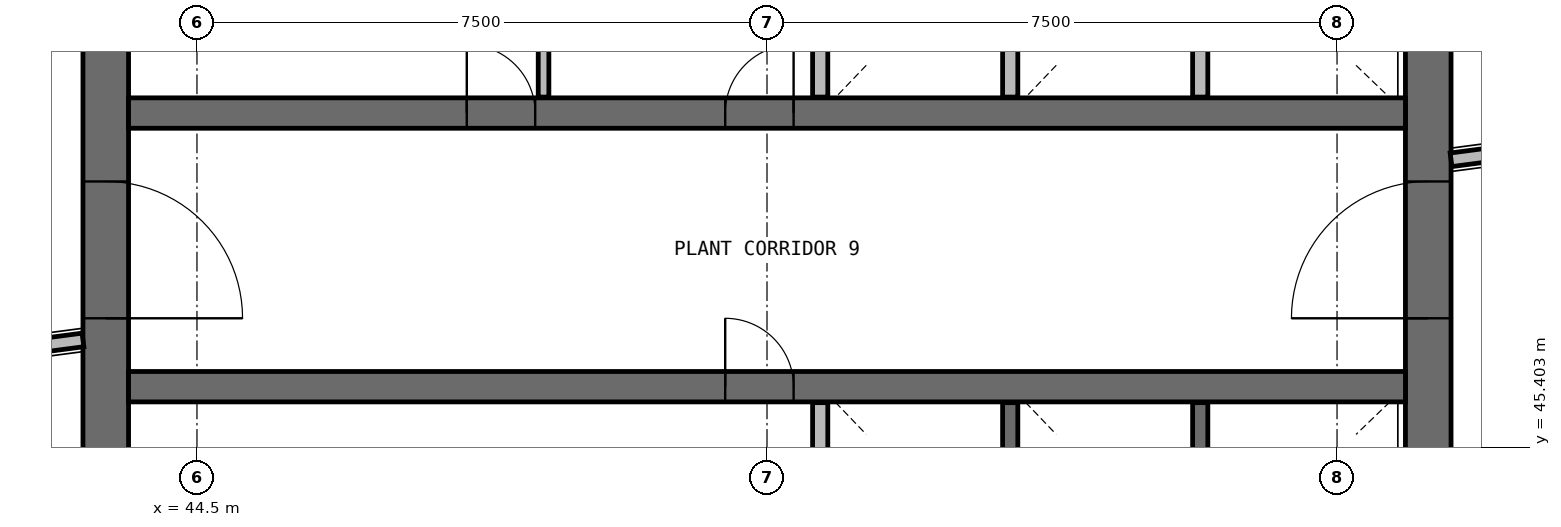
"""IFC4 building model, lengths in metres.
Left out: names, types, materials, properties, quantities, classifications, styles, units other than length and angle.
Written with IfcOpenShell. Run it as: python <this file> out.ifc"""

import sys

from ifc_helpers import new_model, si_unit, direction, frame, frame_2d, origin, place, context, subcontext, project, spatial, rectangle, extrude, source, transform, mapped, element, fill, save


model = new_model("IFC4")
c1 = context("Model", 3, precision=1e-05, world=origin(), true_north=direction((0.0, 1.0)))
c2 = subcontext(c1, "Body", "Model", "MODEL_VIEW")
j1 = project(units=[si_unit("LENGTHUNIT", "METRE"), si_unit("PLANEANGLEUNIT", "RADIAN")], contexts=[c1])
p1 = place(None, origin())
s1 = spatial("IfcSite", under=j1, at=p1, CompositionType="ELEMENT")
p2 = place(p1, origin())
s2 = spatial("IfcBuilding", under=s1, at=p2, CompositionType="ELEMENT")
p3 = place(p2, frame((0.0, 0.0, 230.6)))
s3 = spatial("IfcBuildingStorey", under=s2, at=p3, CompositionType="ELEMENT", Elevation=230.6)
p4 = place(p3, frame((60.7, 40.0, 0.0), z_axis=(0.0, 0.0, 1.0), x_axis=(0.0, 1.0, 0.0)))
e1 = element("IfcWall", 1, at=p4, inside=s3, PredefinedType="SHEAR", context=c2, shape_type="SweptSolid", body=[
    extrude(rectangle(XDim=16.0, YDim=0.6, at=frame_2d((8.0, 0.0))), origin(), (0.0, 0.0, 1.0), 3.9),
])
p5 = place(p4, frame((7.1, 0.0, 0.0)))
e2 = element("IfcOpeningElement", 2, at=p5, cuts=e1, PredefinedType="OPENING", context=c2, shape_type="SweptSolid", body=[
    extrude(rectangle(XDim=1.8, YDim=2.1, at=frame_2d((0.9, 1.05))), frame((0.0, 0.31, 0.0), z_axis=(0.0, -1.0, 0.0), x_axis=(1.0, 0.0, 0.0)), (0.0, 0.0, 1.0), 0.62),
])
p6 = place(p3, frame((43.3, 56.0, 0.0), z_axis=(0.0, 0.0, 1.0), x_axis=(0.0, -1.0, 0.0)))
e3 = element("IfcWall", 3, at=p6, inside=s3, PredefinedType="SHEAR", context=c2, shape_type="SweptSolid", body=[
    extrude(rectangle(XDim=16.0, YDim=0.6, at=frame_2d((8.0, 0.0))), origin(), (0.0, 0.0, 1.0), 3.9),
])
p7 = place(p6, frame((7.1, 0.0, 0.0)))
e4 = element("IfcOpeningElement", 4, at=p7, cuts=e3, PredefinedType="OPENING", context=c2, shape_type="SweptSolid", body=[
    extrude(rectangle(XDim=1.8, YDim=2.1, at=frame_2d((0.9, 1.05))), frame((0.0, 0.31, 0.0), z_axis=(0.0, -1.0, 0.0), x_axis=(1.0, 0.0, 0.0)), (0.0, 0.0, 1.0), 0.62),
])
p8 = place(p3, frame((43.6, 49.8, 0.0), z_axis=(0.0, 0.0, 1.0), x_axis=(1.0, 0.0, 0.0)))
e5 = element("IfcWall", 5, at=p8, inside=s3, PredefinedType="SHEAR", context=c2, shape_type="SweptSolid", body=[
    extrude(rectangle(XDim=16.8, YDim=0.4, at=frame_2d((8.4, 0.0))), origin(), (0.0, 0.0, 1.0), 3.9),
])
p9 = place(p8, frame((4.45, 0.0, 0.0)))
e6 = element("IfcOpeningElement", 6, at=p9, cuts=e5, PredefinedType="OPENING", context=c2, shape_type="SweptSolid", body=[
    extrude(rectangle(XDim=0.9, YDim=2.1, at=frame_2d((0.45, 1.05))), frame((0.0, 0.21, 0.0), z_axis=(0.0, -1.0, 0.0), x_axis=(1.0, 0.0, 0.0)), (0.0, 0.0, 1.0), 0.42),
])
p10 = place(p8, frame((7.85, 0.0, 0.0)))
e7 = element("IfcOpeningElement", 7, at=p10, cuts=e5, PredefinedType="OPENING", context=c2, shape_type="SweptSolid", body=[
    extrude(rectangle(XDim=0.9, YDim=2.1, at=frame_2d((0.45, 1.05))), frame((0.0, 0.21, 0.0), z_axis=(0.0, -1.0, 0.0), x_axis=(1.0, 0.0, 0.0)), (0.0, 0.0, 1.0), 0.42),
])
p11 = place(p3, frame((43.6, 46.2, 0.0), z_axis=(0.0, 0.0, 1.0), x_axis=(1.0, 0.0, 0.0)))
e8 = element("IfcWall", 8, at=p11, inside=s3, PredefinedType="SHEAR", context=c2, shape_type="SweptSolid", body=[
    extrude(rectangle(XDim=16.8, YDim=0.4, at=frame_2d((8.4, 0.0))), origin(), (0.0, 0.0, 1.0), 3.9),
])
p12 = place(p11, frame((7.85, 0.0, 0.0)))
e9 = element("IfcOpeningElement", 9, at=p12, cuts=e8, PredefinedType="OPENING", context=c2, shape_type="SweptSolid", body=[
    extrude(rectangle(XDim=0.9, YDim=2.1, at=frame_2d((0.45, 1.05))), frame((0.0, 0.21, 0.0), z_axis=(0.0, -1.0, 0.0), x_axis=(1.0, 0.0, 0.0)), (0.0, 0.0, 1.0), 0.42),
])
for number, where, z_axis, x_axis in (
    (10, (52.7, 45.99, 0.0), (0.0, 0.0, 1.0), (0.0, -1.0, 0.0)),
    (11, (52.7, 52.37, 0.0), (0.0, 0.0, 1.0), (0.0, -1.0, 0.0)),
    (12, (55.2, 43.63, 0.0), (0.0, 0.0, 1.0), (0.0, 1.0, 0.0)),
    (13, (55.2, 50.01, 0.0), (0.0, 0.0, 1.0), (0.0, 1.0, 0.0)),
    (14, (57.7, 43.63, 0.0), (0.0, 0.0, 1.0), (0.0, 1.0, 0.0)),
):
    element("IfcWall", number, at=place(p3, frame(where, z_axis=z_axis, x_axis=x_axis)), inside=s3, PredefinedType="SOLIDWALL", context=c2, shape_type="SweptSolid", body=[
        extrude(rectangle(XDim=2.36, YDim=0.2, at=frame_2d((1.18, 0.0))), origin(), (0.0, 0.0, 1.0), 3.58),
    ])
p13 = place(p3, frame((57.7, 50.01, 0.0), z_axis=(0.0, 0.0, 1.0), x_axis=(0.0, 1.0, 0.0)))
e15 = element("IfcWall", 15, at=p13, inside=s3, PredefinedType="SOLIDWALL", context=c2, shape_type="SweptSolid", body=[
    extrude(rectangle(XDim=2.39, YDim=0.2, at=frame_2d((1.195, 0.0))), origin(), (0.0, 0.0, 1.0), 3.58),
])
p14 = place(p3, frame((40.69, 46.511, 0.0), z_axis=(0.0, 0.0, 1.0), x_axis=(0.991440737811, 0.130557509967, 0.0)))
e16 = element("IfcWall", 16, at=p14, inside=s3, PredefinedType="PARTITIONING", context=c2, shape_type="SweptSolid", body=[
    extrude(rectangle(XDim=2.33, YDim=0.18, at=frame_2d((1.165, 0.0))), origin(), (0.0, 0.0, 1.0), 2.38),
])
p15 = place(p14, frame((0.48, 0.0, 0.0)))
e17 = element("IfcOpeningElement", 17, at=p15, cuts=e16, PredefinedType="OPENING", context=c2, shape_type="SweptSolid", body=[
    extrude(rectangle(XDim=1.2, YDim=2.1, at=frame_2d((0.6, 1.05))), frame((0.0, 0.1, 0.0), z_axis=(0.0, -1.0, 0.0), x_axis=(1.0, 0.0, 0.0)), (0.0, 0.0, 1.0), 0.2),
])
p16 = place(p3, frame((63.31, 49.489, 0.0), z_axis=(0.0, 0.0, 1.0), x_axis=(-0.991440737811, -0.130557509967, 0.0)))
e18 = element("IfcWall", 18, at=p16, inside=s3, PredefinedType="PARTITIONING", context=c2, shape_type="SweptSolid", body=[
    extrude(rectangle(XDim=2.33, YDim=0.18, at=frame_2d((1.165, 0.0))), origin(), (0.0, 0.0, 1.0), 2.38),
])
p17 = place(p16, frame((0.48, 0.0, 0.0)))
e19 = element("IfcOpeningElement", 19, at=p17, cuts=e18, PredefinedType="OPENING", context=c2, shape_type="SweptSolid", body=[
    extrude(rectangle(XDim=1.2, YDim=2.1, at=frame_2d((0.6, 1.05))), frame((0.0, 0.1, 0.0), z_axis=(0.0, -1.0, 0.0), x_axis=(1.0, 0.0, 0.0)), (0.0, 0.0, 1.0), 0.2),
])
p18 = place(p3, frame((49.06, 50.01, 0.0), z_axis=(0.0, 0.0, 1.0), x_axis=(0.0, 1.0, 0.0)))
e20 = element("IfcWall", 20, at=p18, inside=s3, PredefinedType="PARTITIONING", context=c2, shape_type="SweptSolid", body=[
    extrude(rectangle(XDim=2.29, YDim=0.14, at=frame_2d((1.145, 0.0))), origin(), (0.0, 0.0, 1.0), 2.88),
])
m1 = source(origin(), c2, "Body", "SweptSolid", [
    extrude(rectangle(XDim=1.8, YDim=2.1, at=frame_2d((0.9, 1.05))), frame((0.0, 0.025, 0.0), z_axis=(0.0, -1.0, 0.0), x_axis=(1.0, 0.0, 0.0)), (0.0, 0.0, 1.0), 0.05),
])
p19 = place(p7, origin())
e21 = element("IfcDoor", 21, at=p19, inside=s3, OperationType="SINGLE_SWING_RIGHT", PredefinedType="DOOR", context=c2, shape_type="MappedRepresentation", body=[
    mapped(m1, transform((0.0, 0.0, 0.0), scale=1.0)),
])
fill(e4, e21)
p20 = place(p5, origin())
e22 = element("IfcDoor", 22, at=p20, inside=s3, OperationType="SINGLE_SWING_LEFT", PredefinedType="DOOR", context=c2, shape_type="MappedRepresentation", body=[
    mapped(m1, transform((0.0, 0.0, 0.0), scale=1.0)),
])
fill(e2, e22)
m2 = source(origin(), c2, "Body", "SweptSolid", [
    extrude(rectangle(XDim=0.9, YDim=2.1, at=frame_2d((0.45, 1.05))), frame((0.0, 0.025, 0.0), z_axis=(0.0, -1.0, 0.0), x_axis=(1.0, 0.0, 0.0)), (0.0, 0.0, 1.0), 0.05),
])
p21 = place(p9, origin())
e23 = element("IfcDoor", 23, at=p21, inside=s3, OperationType="SINGLE_SWING_LEFT", PredefinedType="DOOR", context=c2, shape_type="MappedRepresentation", body=[
    mapped(m2, transform((0.0, 0.0, 0.0), scale=1.0)),
])
fill(e6, e23)
p22 = place(p10, origin())
e24 = element("IfcDoor", 24, at=p22, inside=s3, OperationType="SINGLE_SWING_RIGHT", PredefinedType="DOOR", context=c2, shape_type="MappedRepresentation", body=[
    mapped(m2, transform((0.0, 0.0, 0.0), scale=1.0)),
])
fill(e7, e24)
p23 = place(p12, origin())
e25 = element("IfcDoor", 25, at=p23, inside=s3, OperationType="SINGLE_SWING_LEFT", PredefinedType="DOOR", context=c2, shape_type="MappedRepresentation", body=[
    mapped(m2, transform((0.0, 0.0, 0.0), scale=1.0)),
])
fill(e9, e25)
save(model, sys.argv[1])
